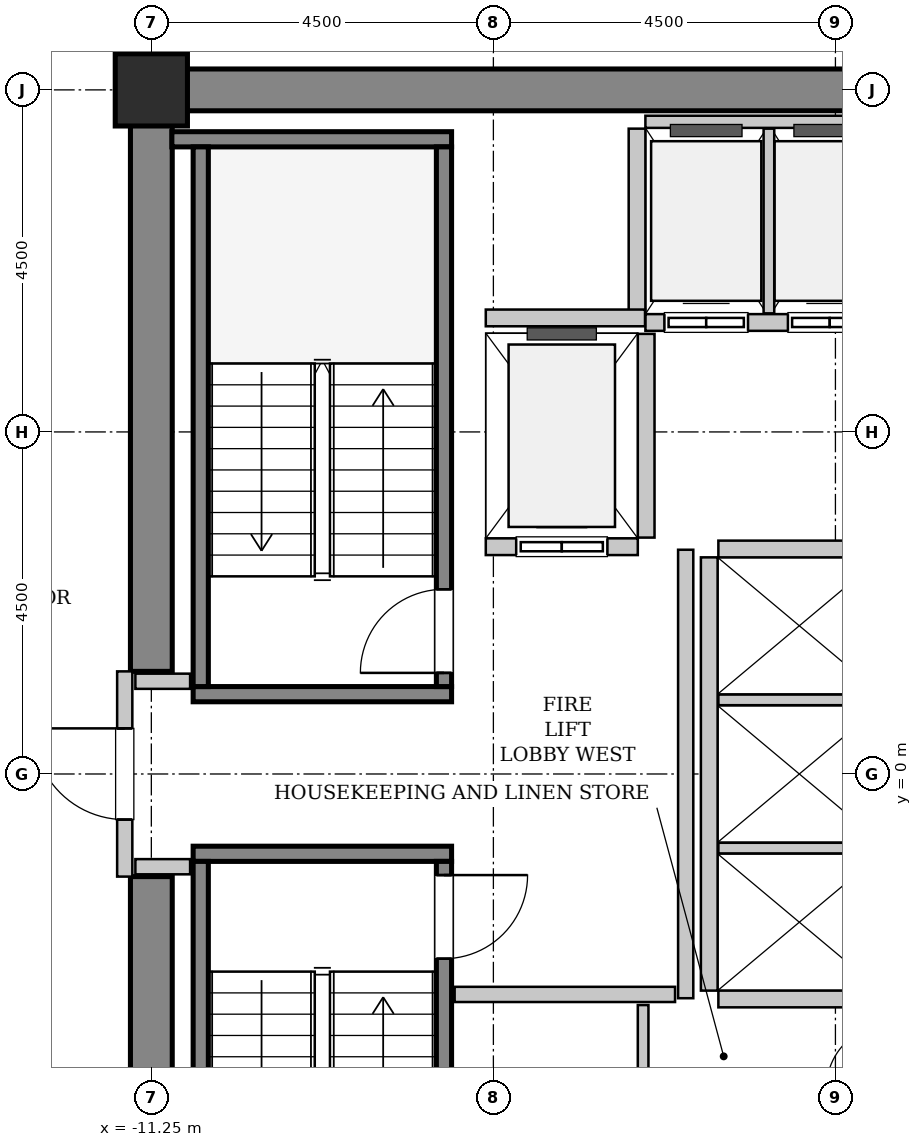
"""IFC4 building model, lengths in metres.
Left out: names, types, materials, properties, quantities, classifications, styles, units other than length and angle.
Written with IfcOpenShell. Run it as: python <this file> out.ifc"""

import sys

from ifc_helpers import new_model, si_unit, direction, frame, frame_2d, origin, origin_2d, place, context, subcontext, project, spatial, rectangle, hollow_rectangle, extrude, source, transform, mapped, element, fill, save


model = new_model("IFC4")
c1 = context("Model", 3, precision=1e-05, world=origin(), true_north=direction((0.0, 1.0)))
c2 = subcontext(c1, "Body", "Model", "MODEL_VIEW")
j1 = project(units=[si_unit("LENGTHUNIT", "METRE"), si_unit("PLANEANGLEUNIT", "RADIAN")], contexts=[c1])
p1 = place(None, origin())
s1 = spatial("IfcSite", under=j1, at=p1, CompositionType="ELEMENT")
p2 = place(p1, origin())
s2 = spatial("IfcBuilding", under=s1, at=p2, CompositionType="ELEMENT")
p3 = place(p2, frame((0.0, 0.0, 90.8)))
s3 = spatial("IfcBuildingStorey", under=s2, at=p3, CompositionType="ELEMENT", Elevation=90.8)
m1 = source(origin(), c2, "Body", "SweptSolid", [
    extrude(rectangle(XDim=9.975, YDim=0.55, at=frame_2d((4.987, 0.0))), origin(), (0.0, 0.0, 1.0), 3.8),
])
p4 = place(p3, frame((-11.525, 9.0, 0.0), z_axis=(0.0, 0.0, 1.0), x_axis=(1.0, 0.0, 0.0)))
e1 = element("IfcWall", 1, at=p4, inside=s3, PredefinedType="SHEAR", context=c2, shape_type="MappedRepresentation", body=[
    mapped(m1, transform((0.0, 0.0, 0.0), x_axis=(1.0, 0.0, 0.0), y_axis=(0.0, 1.0, 0.0), z_axis=(0.0, 0.0, 1.0), scale=1.0)),
])
m2 = source(origin(), c2, "Body", "SweptSolid", [
    extrude(rectangle(XDim=7.375, YDim=0.55, at=frame_2d((3.688, 0.0))), origin(), (0.0, 0.0, 1.0), 3.8),
])
for number, where, z_axis, x_axis in (
    (2, (-11.25, -8.725, 0.0), (0.0, 0.0, 1.0), (0.0, 1.0, 0.0)),
    (3, (-11.25, 1.35, 0.0), (0.0, 0.0, 1.0), (0.0, 1.0, 0.0)),
):
    element("IfcWall", number, at=place(p3, frame(where, z_axis=z_axis, x_axis=x_axis)), inside=s3, PredefinedType="SHEAR", context=c2, shape_type="MappedRepresentation", body=[
        mapped(m2, transform((0.0, 0.0, 0.0), x_axis=(1.0, 0.0, 0.0), y_axis=(0.0, 1.0, 0.0), z_axis=(0.0, 0.0, 1.0), scale=1.0)),
    ])
m3 = source(origin(), c2, "Body", "SweptSolid", [
    extrude(hollow_rectangle(XDim=0.95, YDim=0.95, WallThickness=0.045, InnerFilletRadius=0.045, OuterFilletRadius=0.09, at=origin_2d()), origin(), (0.0, 0.0, 1.0), 3.8),
])
p5 = place(p3, frame((-11.25, 9.0, 0.0), z_axis=(0.0, 0.0, 1.0), x_axis=(1.0, 0.0, 0.0)))
e4 = element("IfcColumn", 4, at=p5, inside=s3, PredefinedType="COLUMN", context=c2, shape_type="MappedRepresentation", body=[
    mapped(m3, transform((0.0, 0.0, 0.0), x_axis=(1.0, 0.0, 0.0), y_axis=(0.0, 1.0, 0.0), z_axis=(0.0, 0.0, 1.0), scale=1.0)),
])
m4 = source(origin(), c2, "Body", "SweptSolid", [
    extrude(rectangle(XDim=3.4, YDim=0.2, at=frame_2d((1.7, 0.0))), origin(), (0.0, 0.0, 1.0), 3.8),
])
p6 = place(p3, frame((-7.3, 1.05, 0.0), z_axis=(0.0, 0.0, 1.0), x_axis=(-1.0, 0.0, 0.0)))
e5 = element("IfcWall", 5, at=p6, inside=s3, PredefinedType="SOLIDWALL", context=c2, shape_type="MappedRepresentation", body=[
    mapped(m4, transform((0.0, 0.0, 0.0), x_axis=(1.0, 0.0, 0.0), y_axis=(0.0, 1.0, 0.0), z_axis=(0.0, 0.0, 1.0), scale=1.0)),
])
m5 = source(origin(), c2, "Body", "SweptSolid", [
    extrude(rectangle(XDim=3.68, YDim=0.2, at=frame_2d((1.84, 0.0))), origin(), (0.0, 0.0, 1.0), 3.8),
])
p7 = place(p3, frame((-7.3, 8.35, 0.0), z_axis=(0.0, 0.0, 1.0), x_axis=(-1.0, 0.0, 0.0)))
e6 = element("IfcWall", 6, at=p7, inside=s3, PredefinedType="SOLIDWALL", context=c2, shape_type="MappedRepresentation", body=[
    mapped(m5, transform((0.0, 0.0, 0.0), x_axis=(1.0, 0.0, 0.0), y_axis=(0.0, 1.0, 0.0), z_axis=(0.0, 0.0, 1.0), scale=1.0)),
])
m6 = source(origin(), c2, "Body", "SweptSolid", [
    extrude(rectangle(XDim=7.1, YDim=0.2, at=frame_2d((3.55, 0.0))), origin(), (0.0, 0.0, 1.0), 3.8),
])
p8 = place(p3, frame((-7.4, 1.15, 0.0), z_axis=(0.0, 0.0, 1.0), x_axis=(0.0, 1.0, 0.0)))
e7 = element("IfcWall", 7, at=p8, inside=s3, PredefinedType="SOLIDWALL", context=c2, shape_type="MappedRepresentation", body=[
    mapped(m6, transform((0.0, 0.0, 0.0), x_axis=(1.0, 0.0, 0.0), y_axis=(0.0, 1.0, 0.0), z_axis=(0.0, 0.0, 1.0), scale=1.0)),
])
p9 = place(p8, frame((0.18, 0.0, 0.0)))
e8 = element("IfcOpeningElement", 8, at=p9, cuts=e7, PredefinedType="OPENING", context=c2, shape_type="SweptSolid", body=[
    extrude(rectangle(XDim=1.1, YDim=2.15, at=frame_2d((0.55, 1.075))), frame((0.0, 0.11, 0.0), z_axis=(0.0, -1.0, 0.0), x_axis=(1.0, 0.0, 0.0)), (0.0, 0.0, 1.0), 0.22),
])
p10 = place(p3, frame((-10.6, 1.15, 0.0), z_axis=(0.0, 0.0, 1.0), x_axis=(0.0, 1.0, 0.0)))
e9 = element("IfcWall", 9, at=p10, inside=s3, PredefinedType="SOLIDWALL", context=c2, shape_type="MappedRepresentation", body=[
    mapped(m6, transform((0.0, 0.0, 0.0), x_axis=(1.0, 0.0, 0.0), y_axis=(0.0, 1.0, 0.0), z_axis=(0.0, 0.0, 1.0), scale=1.0)),
])
p11 = place(p3, frame((-10.7, -1.05, 0.0), z_axis=(0.0, 0.0, 1.0), x_axis=(1.0, 0.0, 0.0)))
e10 = element("IfcWall", 10, at=p11, inside=s3, PredefinedType="SOLIDWALL", context=c2, shape_type="MappedRepresentation", body=[
    mapped(m4, transform((0.0, 0.0, 0.0), x_axis=(1.0, 0.0, 0.0), y_axis=(0.0, 1.0, 0.0), z_axis=(0.0, 0.0, 1.0), scale=1.0)),
])
p12 = place(p3, frame((-10.6, -1.15, 0.0), z_axis=(0.0, 0.0, 1.0), x_axis=(0.0, -1.0, 0.0)))
e11 = element("IfcWall", 11, at=p12, inside=s3, PredefinedType="SOLIDWALL", context=c2, shape_type="MappedRepresentation", body=[
    mapped(m6, transform((0.0, 0.0, 0.0), x_axis=(1.0, 0.0, 0.0), y_axis=(0.0, 1.0, 0.0), z_axis=(0.0, 0.0, 1.0), scale=1.0)),
])
p13 = place(p3, frame((-7.4, -1.15, 0.0), z_axis=(0.0, 0.0, 1.0), x_axis=(0.0, -1.0, 0.0)))
e12 = element("IfcWall", 12, at=p13, inside=s3, PredefinedType="SOLIDWALL", context=c2, shape_type="MappedRepresentation", body=[
    mapped(m6, transform((0.0, 0.0, 0.0), x_axis=(1.0, 0.0, 0.0), y_axis=(0.0, 1.0, 0.0), z_axis=(0.0, 0.0, 1.0), scale=1.0)),
])
p14 = place(p13, frame((0.18, 0.0, 0.0)))
e13 = element("IfcOpeningElement", 13, at=p14, cuts=e12, PredefinedType="OPENING", context=c2, shape_type="SweptSolid", body=[
    extrude(rectangle(XDim=1.1, YDim=2.15, at=frame_2d((0.55, 1.075))), frame((0.0, 0.11, 0.0), z_axis=(0.0, -1.0, 0.0), x_axis=(1.0, 0.0, 0.0)), (0.0, 0.0, 1.0), 0.22),
])
m7 = source(origin(), c2, "Body", "SweptSolid", [
    extrude(rectangle(XDim=2.0, YDim=0.22, at=frame_2d((1.0, 0.0))), origin(), (0.0, 0.0, 1.0), 3.535),
])
p15 = place(p3, frame((-6.85, 2.99, 0.0), z_axis=(0.0, 0.0, 1.0), x_axis=(1.0, 0.0, 0.0)))
e14 = element("IfcWall", 14, at=p15, inside=s3, PredefinedType="SOLIDWALL", context=c2, shape_type="MappedRepresentation", body=[
    mapped(m7, transform((0.0, 0.0, 0.0), x_axis=(1.0, 0.0, 0.0), y_axis=(0.0, 1.0, 0.0), z_axis=(0.0, 0.0, 1.0), scale=1.0)),
])
p16 = place(p15, frame((0.4, 0.0, 0.0)))
e15 = element("IfcOpeningElement", 15, at=p16, cuts=e14, PredefinedType="OPENING", context=c2, shape_type="SweptSolid", body=[
    extrude(rectangle(XDim=1.2, YDim=2.2, at=frame_2d((0.6, 1.1))), frame((0.0, 0.12, 0.0), z_axis=(0.0, -1.0, 0.0), x_axis=(1.0, 0.0, 0.0)), (0.0, 0.0, 1.0), 0.24),
])
m8 = source(origin(), c2, "Body", "SweptSolid", [
    extrude(rectangle(XDim=2.68, YDim=0.22, at=frame_2d((1.34, 0.0))), origin(), (0.0, 0.0, 1.0), 3.535),
])
p17 = place(p3, frame((-4.74, 3.11, 0.0), z_axis=(0.0, 0.0, 1.0), x_axis=(0.0, 1.0, 0.0)))
e16 = element("IfcWall", 16, at=p17, inside=s3, PredefinedType="SOLIDWALL", context=c2, shape_type="MappedRepresentation", body=[
    mapped(m8, transform((0.0, 0.0, 0.0), x_axis=(1.0, 0.0, 0.0), y_axis=(0.0, 1.0, 0.0), z_axis=(0.0, 0.0, 1.0), scale=1.0)),
])
m9 = source(origin(), c2, "Body", "SweptSolid", [
    extrude(rectangle(XDim=3.2, YDim=0.22, at=frame_2d((1.6, 0.0))), origin(), (0.0, 0.0, 1.0), 3.535),
])
p18 = place(p3, frame((-4.75, 5.94, 0.0), z_axis=(0.0, 0.0, 1.0), x_axis=(1.0, 0.0, 0.0)))
e17 = element("IfcWall", 17, at=p18, inside=s3, PredefinedType="SOLIDWALL", context=c2, shape_type="MappedRepresentation", body=[
    mapped(m9, transform((0.0, 0.0, 0.0), x_axis=(1.0, 0.0, 0.0), y_axis=(0.0, 1.0, 0.0), z_axis=(0.0, 0.0, 1.0), scale=1.0)),
])
p19 = place(p18, frame((0.25, 0.0, 0.0)))
e18 = element("IfcOpeningElement", 18, at=p19, cuts=e17, PredefinedType="OPENING", context=c2, shape_type="SweptSolid", body=[
    extrude(rectangle(XDim=1.1, YDim=2.2, at=frame_2d((0.55, 1.1))), frame((0.0, 0.12, 0.0), z_axis=(0.0, -1.0, 0.0), x_axis=(1.0, 0.0, 0.0)), (0.0, 0.0, 1.0), 0.24),
])
p20 = place(p18, frame((1.875, 0.0, 0.0)))
e19 = element("IfcOpeningElement", 19, at=p20, cuts=e17, PredefinedType="OPENING", context=c2, shape_type="SweptSolid", body=[
    extrude(rectangle(XDim=1.1, YDim=2.2, at=frame_2d((0.55, 1.1))), frame((0.0, 0.12, 0.0), z_axis=(0.0, -1.0, 0.0), x_axis=(1.0, 0.0, 0.0)), (0.0, 0.0, 1.0), 0.24),
])
m10 = source(origin(), c2, "Body", "SweptSolid", [
    extrude(rectangle(XDim=3.2, YDim=0.16, at=frame_2d((1.6, 0.0))), origin(), (0.0, 0.0, 1.0), 2.425),
])
p21 = place(p3, frame((-1.55, 8.58, 0.0), z_axis=(0.0, 0.0, 1.0), x_axis=(-1.0, 0.0, 0.0)))
e20 = element("IfcWall", 20, at=p21, inside=s3, PredefinedType="PARTITIONING", context=c2, shape_type="MappedRepresentation", body=[
    mapped(m10, transform((0.0, 0.0, 0.0), x_axis=(1.0, 0.0, 0.0), y_axis=(0.0, 1.0, 0.0), z_axis=(0.0, 0.0, 1.0), scale=1.0)),
])
m11 = source(origin(), c2, "Body", "SweptSolid", [
    extrude(rectangle(XDim=2.43, YDim=0.22, at=frame_2d((1.215, 0.0))), origin(), (0.0, 0.0, 1.0), 3.535),
])
p22 = place(p3, frame((-4.86, 8.49, 0.0), z_axis=(0.0, 0.0, 1.0), x_axis=(0.0, -1.0, 0.0)))
e21 = element("IfcWall", 21, at=p22, inside=s3, PredefinedType="SOLIDWALL", context=c2, shape_type="MappedRepresentation", body=[
    mapped(m11, transform((0.0, 0.0, 0.0), x_axis=(1.0, 0.0, 0.0), y_axis=(0.0, 1.0, 0.0), z_axis=(0.0, 0.0, 1.0), scale=1.0)),
])
m12 = source(origin(), c2, "Body", "SweptSolid", [
    extrude(rectangle(XDim=2.43, YDim=0.14, at=frame_2d((1.215, 0.0))), origin(), (0.0, 0.0, 1.0), 3.535),
])
p23 = place(p3, frame((-3.125, 6.06, 0.0), z_axis=(0.0, 0.0, 1.0), x_axis=(0.0, 1.0, 0.0)))
e22 = element("IfcWall", 22, at=p23, inside=s3, PredefinedType="PARTITIONING", context=c2, shape_type="MappedRepresentation", body=[
    mapped(m12, transform((0.0, 0.0, 0.0), x_axis=(1.0, 0.0, 0.0), y_axis=(0.0, 1.0, 0.0), z_axis=(0.0, 0.0, 1.0), scale=1.0)),
])
m13 = source(origin(), c2, "Body", "SweptSolid", [
    extrude(rectangle(XDim=5.7, YDim=0.22, at=frame_2d((2.85, 0.0))), origin(), (0.0, 0.0, 1.0), 3.535),
])
p24 = place(p3, frame((-3.91, 2.85, 0.0), z_axis=(0.0, 0.0, 1.0), x_axis=(0.0, -1.0, 0.0)))
e23 = element("IfcWall", 23, at=p24, inside=s3, PredefinedType="SOLIDWALL", context=c2, shape_type="MappedRepresentation", body=[
    mapped(m13, transform((0.0, 0.0, 0.0), x_axis=(1.0, 0.0, 0.0), y_axis=(0.0, 1.0, 0.0), z_axis=(0.0, 0.0, 1.0), scale=1.0)),
])
m14 = source(origin(), c2, "Body", "SweptSolid", [
    extrude(rectangle(XDim=2.13, YDim=0.22, at=frame_2d((1.065, 0.0))), origin(), (0.0, 0.0, 1.0), 3.535),
])
p25 = place(p3, frame((-3.79, -2.96, 0.0), z_axis=(0.0, 0.0, 1.0), x_axis=(1.0, 0.0, 0.0)))
e24 = element("IfcWall", 24, at=p25, inside=s3, PredefinedType="SOLIDWALL", context=c2, shape_type="MappedRepresentation", body=[
    mapped(m14, transform((0.0, 0.0, 0.0), x_axis=(1.0, 0.0, 0.0), y_axis=(0.0, 1.0, 0.0), z_axis=(0.0, 0.0, 1.0), scale=1.0)),
])
m15 = source(origin(), c2, "Body", "SweptSolid", [
    extrude(rectangle(XDim=2.13, YDim=0.14, at=frame_2d((1.065, 0.0))), origin(), (0.0, 0.0, 1.0), 3.535),
])
for number, where, z_axis, x_axis in (
    (25, (-3.79, -0.975, 0.0), (0.0, 0.0, 1.0), (1.0, 0.0, 0.0)),
    (26, (-3.79, 0.975, 0.0), (0.0, 0.0, 1.0), (1.0, 0.0, 0.0)),
):
    element("IfcWall", number, at=place(p3, frame(where, z_axis=z_axis, x_axis=x_axis)), inside=s3, PredefinedType="PARTITIONING", context=c2, shape_type="MappedRepresentation", body=[
        mapped(m15, transform((0.0, 0.0, 0.0), x_axis=(1.0, 0.0, 0.0), y_axis=(0.0, 1.0, 0.0), z_axis=(0.0, 0.0, 1.0), scale=1.0)),
    ])
p26 = place(p3, frame((-1.66, 2.96, 0.0), z_axis=(0.0, 0.0, 1.0), x_axis=(-1.0, 0.0, 0.0)))
e27 = element("IfcWall", 27, at=p26, inside=s3, PredefinedType="SOLIDWALL", context=c2, shape_type="MappedRepresentation", body=[
    mapped(m14, transform((0.0, 0.0, 0.0), x_axis=(1.0, 0.0, 0.0), y_axis=(0.0, 1.0, 0.0), z_axis=(0.0, 0.0, 1.0), scale=1.0)),
])
m16 = source(origin(), c2, "Body", "SweptSolid", [
    extrude(rectangle(XDim=2.095, YDim=0.22, at=frame_2d((1.048, 0.0))), origin(), (0.0, 0.0, 1.0), 3.535),
])
p27 = place(p3, frame((-6.85, 6.0, 0.0), z_axis=(0.0, 0.0, 1.0), x_axis=(1.0, 0.0, 0.0)))
e28 = element("IfcWall", 28, at=p27, inside=s3, PredefinedType="SOLIDWALL", context=c2, shape_type="MappedRepresentation", body=[
    mapped(m16, transform((0.0, 0.0, 0.0), x_axis=(1.0, 0.0, 0.0), y_axis=(0.0, 1.0, 0.0), z_axis=(0.0, 0.0, 1.0), scale=1.0)),
])
m17 = source(origin(), c2, "Body", "SweptSolid", [
    extrude(rectangle(XDim=2.7, YDim=0.2, at=frame_2d((1.35, 0.0))), origin(), (0.0, 0.0, 1.0), 2.425),
])
p28 = place(p3, frame((-11.6, -1.35, 0.0), z_axis=(0.0, 0.0, 1.0), x_axis=(0.0, 1.0, 0.0)))
e29 = element("IfcWall", 29, at=p28, inside=s3, PredefinedType="PARTITIONING", context=c2, shape_type="MappedRepresentation", body=[
    mapped(m17, transform((0.0, 0.0, 0.0), x_axis=(1.0, 0.0, 0.0), y_axis=(0.0, 1.0, 0.0), z_axis=(0.0, 0.0, 1.0), scale=1.0)),
])
p29 = place(p28, frame((0.75, 0.0, 0.0)))
e30 = element("IfcOpeningElement", 30, at=p29, cuts=e29, PredefinedType="OPENING", context=c2, shape_type="SweptSolid", body=[
    extrude(rectangle(XDim=1.2, YDim=2.15, at=frame_2d((0.6, 1.075))), frame((0.0, 0.11, 0.0), z_axis=(0.0, -1.0, 0.0), x_axis=(1.0, 0.0, 0.0)), (0.0, 0.0, 1.0), 0.22),
])
m18 = source(origin(), c2, "Body", "SweptSolid", [
    extrude(rectangle(XDim=5.9, YDim=0.2, at=frame_2d((2.95, 0.0))), origin(), (0.0, 0.0, 1.0), 3.535),
])
p30 = place(p3, frame((-4.22, -2.95, 0.0), z_axis=(0.0, 0.0, 1.0), x_axis=(0.0, 1.0, 0.0)))
e31 = element("IfcWall", 31, at=p30, inside=s3, PredefinedType="PARTITIONING", context=c2, shape_type="MappedRepresentation", body=[
    mapped(m18, transform((0.0, 0.0, 0.0), x_axis=(1.0, 0.0, 0.0), y_axis=(0.0, 1.0, 0.0), z_axis=(0.0, 0.0, 1.0), scale=1.0)),
])
m19 = source(origin(), c2, "Body", "SweptSolid", [
    extrude(rectangle(XDim=2.9, YDim=0.2, at=frame_2d((1.45, 0.0))), origin(), (0.0, 0.0, 1.0), 3.535),
])
p31 = place(p3, frame((-7.26, -2.9, 0.0), z_axis=(0.0, 0.0, 1.0), x_axis=(1.0, 0.0, 0.0)))
e32 = element("IfcWall", 32, at=p31, inside=s3, PredefinedType="PARTITIONING", context=c2, shape_type="MappedRepresentation", body=[
    mapped(m19, transform((0.0, 0.0, 0.0), x_axis=(1.0, 0.0, 0.0), y_axis=(0.0, 1.0, 0.0), z_axis=(0.0, 0.0, 1.0), scale=1.0)),
])
m20 = source(origin(), c2, "Body", "SweptSolid", [
    extrude(rectangle(XDim=0.72, YDim=0.2, at=frame_2d((0.36, 0.0))), origin(), (0.0, 0.0, 1.0), 3.535),
])
for number, where, z_axis, x_axis in (
    (33, (-11.46, 1.22, 0.0), (0.0, 0.0, 1.0), (1.0, 0.0, 0.0)),
    (34, (-11.46, -1.22, 0.0), (0.0, 0.0, 1.0), (1.0, 0.0, 0.0)),
):
    element("IfcWall", number, at=place(p3, frame(where, z_axis=z_axis, x_axis=x_axis)), inside=s3, PredefinedType="PARTITIONING", context=c2, shape_type="MappedRepresentation", body=[
        mapped(m20, transform((0.0, 0.0, 0.0), x_axis=(1.0, 0.0, 0.0), y_axis=(0.0, 1.0, 0.0), z_axis=(0.0, 0.0, 1.0), scale=1.0)),
    ])
m21 = source(origin(), c2, "Body", "SweptSolid", [
    extrude(rectangle(XDim=1.26, YDim=0.14, at=frame_2d((0.63, 0.0))), origin(), (0.0, 0.0, 1.0), 3.535),
])
p32 = place(p3, frame((-4.78, -4.3, 0.0), z_axis=(0.0, 0.0, 1.0), x_axis=(0.0, 1.0, 0.0)))
e35 = element("IfcWall", 35, at=p32, inside=s3, PredefinedType="PARTITIONING", context=c2, shape_type="MappedRepresentation", body=[
    mapped(m21, transform((0.0, 0.0, 0.0), x_axis=(1.0, 0.0, 0.0), y_axis=(0.0, 1.0, 0.0), z_axis=(0.0, 0.0, 1.0), scale=1.0)),
])
m22 = source(origin(), c2, "Body", "SweptSolid", [
    extrude(rectangle(XDim=1.1, YDim=2.15, at=frame_2d((0.55, 1.075))), frame((0.0, 0.025, 0.0), z_axis=(0.0, -1.0, 0.0), x_axis=(1.0, 0.0, 0.0)), (0.0, 0.0, 1.0), 0.05),
])
p33 = place(p9, origin())
e36 = element("IfcDoor", 36, at=p33, inside=s3, OperationType="SINGLE_SWING_LEFT", PredefinedType="DOOR", context=c2, shape_type="MappedRepresentation", body=[
    mapped(m22, transform((0.0, 0.0, 0.0), x_axis=(1.0, 0.0, 0.0), y_axis=(0.0, 1.0, 0.0), z_axis=(0.0, 0.0, 1.0), scale=1.0)),
])
fill(e8, e36)
p34 = place(p14, origin())
e37 = element("IfcDoor", 37, at=p34, inside=s3, OperationType="SINGLE_SWING_LEFT", PredefinedType="DOOR", context=c2, shape_type="MappedRepresentation", body=[
    mapped(m22, transform((0.0, 0.0, 0.0), x_axis=(1.0, 0.0, 0.0), y_axis=(0.0, 1.0, 0.0), z_axis=(0.0, 0.0, 1.0), scale=1.0)),
])
fill(e13, e37)
m23 = source(origin(), c2, "Body", "SweptSolid", [
    extrude(rectangle(XDim=1.2, YDim=2.2, at=frame_2d((0.6, 1.1))), frame((0.0, 0.025, 0.0), z_axis=(0.0, -1.0, 0.0), x_axis=(1.0, 0.0, 0.0)), (0.0, 0.0, 1.0), 0.05),
])
p35 = place(p16, origin())
e38 = element("IfcDoor", 38, at=p35, inside=s3, OperationType="SLIDING_TO_LEFT", PredefinedType="DOOR", context=c2, shape_type="MappedRepresentation", body=[
    mapped(m23, transform((0.0, 0.0, 0.0), x_axis=(1.0, 0.0, 0.0), y_axis=(0.0, 1.0, 0.0), z_axis=(0.0, 0.0, 1.0), scale=1.0)),
])
fill(e15, e38)
m24 = source(origin(), c2, "Body", "SweptSolid", [
    extrude(rectangle(XDim=1.1, YDim=2.2, at=frame_2d((0.55, 1.1))), frame((0.0, 0.025, 0.0), z_axis=(0.0, -1.0, 0.0), x_axis=(1.0, 0.0, 0.0)), (0.0, 0.0, 1.0), 0.05),
])
p36 = place(p19, origin())
e39 = element("IfcDoor", 39, at=p36, inside=s3, OperationType="DOUBLE_DOOR_SLIDING", PredefinedType="DOOR", context=c2, shape_type="MappedRepresentation", body=[
    mapped(m24, transform((0.0, 0.0, 0.0), x_axis=(1.0, 0.0, 0.0), y_axis=(0.0, 1.0, 0.0), z_axis=(0.0, 0.0, 1.0), scale=1.0)),
])
fill(e18, e39)
p37 = place(p20, origin())
e40 = element("IfcDoor", 40, at=p37, inside=s3, OperationType="DOUBLE_DOOR_SLIDING", PredefinedType="DOOR", context=c2, shape_type="MappedRepresentation", body=[
    mapped(m24, transform((0.0, 0.0, 0.0), x_axis=(1.0, 0.0, 0.0), y_axis=(0.0, 1.0, 0.0), z_axis=(0.0, 0.0, 1.0), scale=1.0)),
])
fill(e19, e40)
m25 = source(origin(), c2, "Body", "SweptSolid", [
    extrude(rectangle(XDim=1.2, YDim=2.15, at=frame_2d((0.6, 1.075))), frame((0.0, 0.025, 0.0), z_axis=(0.0, -1.0, 0.0), x_axis=(1.0, 0.0, 0.0)), (0.0, 0.0, 1.0), 0.05),
])
p38 = place(p29, origin())
e41 = element("IfcDoor", 41, at=p38, inside=s3, OperationType="SINGLE_SWING_RIGHT", PredefinedType="DOOR", context=c2, shape_type="MappedRepresentation", body=[
    mapped(m25, transform((0.0, 0.0, 0.0), x_axis=(1.0, 0.0, 0.0), y_axis=(0.0, 1.0, 0.0), z_axis=(0.0, 0.0, 1.0), scale=1.0)),
])
fill(e30, e41)
save(model, sys.argv[1])
